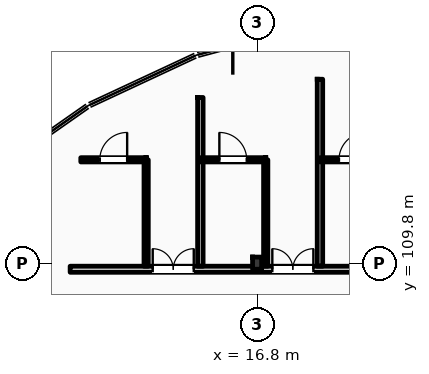
"""IFC4 building model, lengths in metres.
Left out: names, types, materials, properties, quantities, classifications, styles, units other than length and angle.
Written with IfcOpenShell. Run it as: python <this file> out.ifc"""

import sys

from ifc_helpers import new_model, si_unit, direction, frame, frame_2d, origin, origin_2d, place, context, subcontext, project, spatial, rectangle, i_section, extrude, element, fill, save


model = new_model("IFC4")
c1 = context("Model", 3, precision=1e-05, world=origin(), true_north=direction((0.0, 1.0)))
c2 = subcontext(c1, "Body", "Model", "MODEL_VIEW")
j1 = project(units=[si_unit("LENGTHUNIT", "METRE"), si_unit("PLANEANGLEUNIT", "RADIAN")], contexts=[c1])
p1 = place(None, origin())
s1 = spatial("IfcSite", under=j1, at=p1, CompositionType="ELEMENT")
p2 = place(p1, origin())
s2 = spatial("IfcBuilding", under=s1, at=p2, CompositionType="ELEMENT")
p3 = place(p2, frame((0.0, 0.0, 39.0)))
s3 = spatial("IfcBuildingStorey", under=s2, at=p3, CompositionType="ELEMENT", Elevation=39.0)
p4 = place(p3, frame((16.8, 109.8, 0.0), z_axis=(0.0, 0.0, 1.0), x_axis=(1.0, 0.0, 0.0)))
e1 = element("IfcColumn", 1, at=p4, inside=s3, PredefinedType="COLUMN", context=c2, shape_type="SweptSolid", body=[
    extrude(i_section(OverallWidth=0.3, OverallDepth=0.4, WebThickness=0.013, FlangeThickness=0.024, FilletRadius=0.027, at=origin_2d()), origin(), (0.0, 0.0, 1.0), 3.6),
])
p5 = place(p3, frame((10.65, 109.6, 0.0), z_axis=(0.0, 0.0, 1.0), x_axis=(1.0, 0.0, 0.0)))
e2 = element("IfcWall", 2, at=p5, inside=s3, PredefinedType="PARTITIONING", context=c2, shape_type="SweptSolid", body=[
    extrude(rectangle(XDim=84.61, YDim=0.2, at=frame_2d((42.305, 0.0))), origin(), (0.0, 0.0, 1.0), 2.82),
])
p6 = place(p5, frame((15.49, 0.0, 0.0)))
e3 = element("IfcOpeningElement", 3, at=p6, cuts=e2, PredefinedType="OPENING", context=c2, shape_type="SweptSolid", body=[
    extrude(rectangle(XDim=1.02, YDim=2.2, at=frame_2d((0.51, 1.1))), frame((0.0, 0.11, 0.0), z_axis=(0.0, -1.0, 0.0), x_axis=(1.0, 0.0, 0.0)), (0.0, 0.0, 1.0), 0.22),
])
p7 = place(p5, frame((19.703, 0.0, 0.0)))
e4 = element("IfcOpeningElement", 4, at=p7, cuts=e2, PredefinedType="OPENING", context=c2, shape_type="SweptSolid", body=[
    extrude(rectangle(XDim=1.02, YDim=2.2, at=frame_2d((0.51, 1.1))), frame((0.0, 0.11, 0.0), z_axis=(0.0, -1.0, 0.0), x_axis=(1.0, 0.0, 0.0)), (0.0, 0.0, 1.0), 0.22),
])
p8 = place(p5, frame((24.203, 0.0, 0.0)))
e5 = element("IfcOpeningElement", 5, at=p8, cuts=e2, PredefinedType="OPENING", context=c2, shape_type="SweptSolid", body=[
    extrude(rectangle(XDim=1.02, YDim=2.2, at=frame_2d((0.51, 1.1))), frame((0.0, 0.11, 0.0), z_axis=(0.0, -1.0, 0.0), x_axis=(1.0, 0.0, 0.0)), (0.0, 0.0, 1.0), 0.22),
])
p9 = place(p5, frame((26.552, 0.0, 0.0)))
e6 = element("IfcOpeningElement", 6, at=p9, cuts=e2, PredefinedType="OPENING", context=c2, shape_type="SweptSolid", body=[
    extrude(rectangle(XDim=1.02, YDim=2.2, at=frame_2d((0.51, 1.1))), frame((0.0, 0.11, 0.0), z_axis=(0.0, -1.0, 0.0), x_axis=(1.0, 0.0, 0.0)), (0.0, 0.0, 1.0), 0.22),
])
p10 = place(p5, frame((33.233, 0.0, 0.0)))
e7 = element("IfcOpeningElement", 7, at=p10, cuts=e2, PredefinedType="OPENING", context=c2, shape_type="SweptSolid", body=[
    extrude(rectangle(XDim=0.96, YDim=2.2, at=frame_2d((0.48, 1.1))), frame((0.0, 0.11, 0.0), z_axis=(0.0, -1.0, 0.0), x_axis=(1.0, 0.0, 0.0)), (0.0, 0.0, 1.0), 0.22),
])
p11 = place(p5, frame((35.583, 0.0, 0.0)))
e8 = element("IfcOpeningElement", 8, at=p11, cuts=e2, PredefinedType="OPENING", context=c2, shape_type="SweptSolid", body=[
    extrude(rectangle(XDim=0.96, YDim=2.2, at=frame_2d((0.48, 1.1))), frame((0.0, 0.11, 0.0), z_axis=(0.0, -1.0, 0.0), x_axis=(1.0, 0.0, 0.0)), (0.0, 0.0, 1.0), 0.22),
])
p12 = place(p5, frame((42.233, 0.0, 0.0)))
e9 = element("IfcOpeningElement", 9, at=p12, cuts=e2, PredefinedType="OPENING", context=c2, shape_type="SweptSolid", body=[
    extrude(rectangle(XDim=0.96, YDim=2.2, at=frame_2d((0.48, 1.1))), frame((0.0, 0.11, 0.0), z_axis=(0.0, -1.0, 0.0), x_axis=(1.0, 0.0, 0.0)), (0.0, 0.0, 1.0), 0.22),
])
p13 = place(p5, frame((46.983, 0.0, 0.0)))
e10 = element("IfcOpeningElement", 10, at=p13, cuts=e2, PredefinedType="OPENING", context=c2, shape_type="SweptSolid", body=[
    extrude(rectangle(XDim=0.96, YDim=2.2, at=frame_2d((0.48, 1.1))), frame((0.0, 0.11, 0.0), z_axis=(0.0, -1.0, 0.0), x_axis=(1.0, 0.0, 0.0)), (0.0, 0.0, 1.0), 0.22),
])
p14 = place(p5, frame((51.233, 0.0, 0.0)))
e11 = element("IfcOpeningElement", 11, at=p14, cuts=e2, PredefinedType="OPENING", context=c2, shape_type="SweptSolid", body=[
    extrude(rectangle(XDim=0.96, YDim=2.2, at=frame_2d((0.48, 1.1))), frame((0.0, 0.11, 0.0), z_axis=(0.0, -1.0, 0.0), x_axis=(1.0, 0.0, 0.0)), (0.0, 0.0, 1.0), 0.22),
])
p15 = place(p5, frame((55.733, 0.0, 0.0)))
e12 = element("IfcOpeningElement", 12, at=p15, cuts=e2, PredefinedType="OPENING", context=c2, shape_type="SweptSolid", body=[
    extrude(rectangle(XDim=0.96, YDim=2.2, at=frame_2d((0.48, 1.1))), frame((0.0, 0.11, 0.0), z_axis=(0.0, -1.0, 0.0), x_axis=(1.0, 0.0, 0.0)), (0.0, 0.0, 1.0), 0.22),
])
p16 = place(p5, frame((58.083, 0.0, 0.0)))
e13 = element("IfcOpeningElement", 13, at=p16, cuts=e2, PredefinedType="OPENING", context=c2, shape_type="SweptSolid", body=[
    extrude(rectangle(XDim=0.96, YDim=2.2, at=frame_2d((0.48, 1.1))), frame((0.0, 0.11, 0.0), z_axis=(0.0, -1.0, 0.0), x_axis=(1.0, 0.0, 0.0)), (0.0, 0.0, 1.0), 0.22),
])
p17 = place(p5, frame((64.732, 0.0, 0.0)))
e14 = element("IfcOpeningElement", 14, at=p17, cuts=e2, PredefinedType="OPENING", context=c2, shape_type="SweptSolid", body=[
    extrude(rectangle(XDim=0.96, YDim=2.2, at=frame_2d((0.48, 1.1))), frame((0.0, 0.11, 0.0), z_axis=(0.0, -1.0, 0.0), x_axis=(1.0, 0.0, 0.0)), (0.0, 0.0, 1.0), 0.22),
])
p18 = place(p5, frame((66.832, 0.0, 0.0)))
e15 = element("IfcOpeningElement", 15, at=p18, cuts=e2, PredefinedType="OPENING", context=c2, shape_type="SweptSolid", body=[
    extrude(rectangle(XDim=0.96, YDim=2.2, at=frame_2d((0.48, 1.1))), frame((0.0, 0.11, 0.0), z_axis=(0.0, -1.0, 0.0), x_axis=(1.0, 0.0, 0.0)), (0.0, 0.0, 1.0), 0.22),
])
p19 = place(p5, frame((73.732, 0.0, 0.0)))
e16 = element("IfcOpeningElement", 16, at=p19, cuts=e2, PredefinedType="OPENING", context=c2, shape_type="SweptSolid", body=[
    extrude(rectangle(XDim=0.96, YDim=2.2, at=frame_2d((0.48, 1.1))), frame((0.0, 0.11, 0.0), z_axis=(0.0, -1.0, 0.0), x_axis=(1.0, 0.0, 0.0)), (0.0, 0.0, 1.0), 0.22),
])
p20 = place(p5, frame((78.233, 0.0, 0.0)))
e17 = element("IfcOpeningElement", 17, at=p20, cuts=e2, PredefinedType="OPENING", context=c2, shape_type="SweptSolid", body=[
    extrude(rectangle(XDim=0.96, YDim=2.2, at=frame_2d((0.48, 1.1))), frame((0.0, 0.11, 0.0), z_axis=(0.0, -1.0, 0.0), x_axis=(1.0, 0.0, 0.0)), (0.0, 0.0, 1.0), 0.22),
])
p21 = place(p5, frame((80.62, 0.0, 0.0)))
e18 = element("IfcOpeningElement", 18, at=p21, cuts=e2, PredefinedType="OPENING", context=c2, shape_type="SweptSolid", body=[
    extrude(rectangle(XDim=0.96, YDim=2.2, at=frame_2d((0.48, 1.1))), frame((0.0, 0.11, 0.0), z_axis=(0.0, -1.0, 0.0), x_axis=(1.0, 0.0, 0.0)), (0.0, 0.0, 1.0), 0.22),
])
p22 = place(p5, frame((2.716, 0.0, 0.0)))
e19 = element("IfcOpeningElement", 19, at=p22, cuts=e2, PredefinedType="OPENING", context=c2, shape_type="SweptSolid", body=[
    extrude(rectangle(XDim=1.35, YDim=2.25, at=frame_2d((0.675, 1.125))), frame((0.0, 0.11, 0.0), z_axis=(0.0, -1.0, 0.0), x_axis=(1.0, 0.0, 0.0)), (0.0, 0.0, 1.0), 0.22),
])
p23 = place(p5, frame((6.65, 0.0, 0.0)))
e20 = element("IfcOpeningElement", 20, at=p23, cuts=e2, PredefinedType="OPENING", context=c2, shape_type="SweptSolid", body=[
    extrude(rectangle(XDim=1.35, YDim=2.25, at=frame_2d((0.675, 1.125))), frame((0.0, 0.11, 0.0), z_axis=(0.0, -1.0, 0.0), x_axis=(1.0, 0.0, 0.0)), (0.0, 0.0, 1.0), 0.22),
])
p24 = place(p5, frame((10.583, 0.0, 0.0)))
e21 = element("IfcOpeningElement", 21, at=p24, cuts=e2, PredefinedType="OPENING", context=c2, shape_type="SweptSolid", body=[
    extrude(rectangle(XDim=1.35, YDim=2.25, at=frame_2d((0.675, 1.125))), frame((0.0, 0.11, 0.0), z_axis=(0.0, -1.0, 0.0), x_axis=(1.0, 0.0, 0.0)), (0.0, 0.0, 1.0), 0.22),
])
p25 = place(p3, frame((14.933, 109.7, 0.0), z_axis=(0.0, 0.0, 1.0), x_axis=(0.0, 1.0, 0.0)))
e22 = element("IfcWall", 22, at=p25, inside=s3, PredefinedType="PARTITIONING", context=c2, shape_type="SweptSolid", body=[
    extrude(rectangle(XDim=5.55, YDim=0.18, at=frame_2d((2.775, 0.0))), origin(), (0.0, 0.0, 1.0), 3.38),
])
p26 = place(p3, frame((13.15, 109.7, 0.0), z_axis=(0.0, 0.0, 1.0), x_axis=(0.0, 1.0, 0.0)))
e23 = element("IfcWall", 23, at=p26, inside=s3, PredefinedType="PARTITIONING", context=c2, shape_type="SweptSolid", body=[
    extrude(rectangle(XDim=3.5, YDim=0.14, at=frame_2d((1.75, 0.0))), origin(), (0.0, 0.0, 1.0), 3.38),
])
p27 = place(p3, frame((11.0, 113.2, 0.0), z_axis=(0.0, 0.0, 1.0), x_axis=(1.0, 0.0, 0.0)))
e24 = element("IfcWall", 24, at=p27, inside=s3, PredefinedType="PARTITIONING", context=c2, shape_type="SweptSolid", body=[
    extrude(rectangle(XDim=2.15, YDim=0.14, at=frame_2d((1.075, 0.0))), origin(), (0.0, 0.0, 1.0), 3.38),
])
p28 = place(p27, frame((0.625, 0.0, 0.0)))
e25 = element("IfcOpeningElement", 25, at=p28, cuts=e24, PredefinedType="OPENING", context=c2, shape_type="SweptSolid", body=[
    extrude(rectangle(XDim=0.9, YDim=2.1, at=frame_2d((0.45, 1.05))), frame((0.0, 0.08, 0.0), z_axis=(0.0, -1.0, 0.0), x_axis=(1.0, 0.0, 0.0)), (0.0, 0.0, 1.0), 0.16),
])
p29 = place(p3, frame((18.867, 109.7, 0.0), z_axis=(0.0, 0.0, 1.0), x_axis=(0.0, 1.0, 0.0)))
e26 = element("IfcWall", 26, at=p29, inside=s3, PredefinedType="PARTITIONING", context=c2, shape_type="SweptSolid", body=[
    extrude(rectangle(XDim=6.15, YDim=0.18, at=frame_2d((3.075, 0.0))), origin(), (0.0, 0.0, 1.0), 3.38),
])
p30 = place(p3, frame((17.083, 109.7, 0.0), z_axis=(0.0, 0.0, 1.0), x_axis=(0.0, 1.0, 0.0)))
e27 = element("IfcWall", 27, at=p30, inside=s3, PredefinedType="PARTITIONING", context=c2, shape_type="SweptSolid", body=[
    extrude(rectangle(XDim=3.5, YDim=0.14, at=frame_2d((1.75, 0.0))), origin(), (0.0, 0.0, 1.0), 3.38),
])
p31 = place(p3, frame((14.933, 113.2, 0.0), z_axis=(0.0, 0.0, 1.0), x_axis=(1.0, 0.0, 0.0)))
e28 = element("IfcWall", 28, at=p31, inside=s3, PredefinedType="PARTITIONING", context=c2, shape_type="SweptSolid", body=[
    extrude(rectangle(XDim=2.15, YDim=0.14, at=frame_2d((1.075, 0.0))), origin(), (0.0, 0.0, 1.0), 3.38),
])
p32 = place(p31, frame((0.625, 0.0, 0.0)))
e29 = element("IfcOpeningElement", 29, at=p32, cuts=e28, PredefinedType="OPENING", context=c2, shape_type="SweptSolid", body=[
    extrude(rectangle(XDim=0.9, YDim=2.1, at=frame_2d((0.45, 1.05))), frame((0.0, 0.08, 0.0), z_axis=(0.0, -1.0, 0.0), x_axis=(1.0, 0.0, 0.0)), (0.0, 0.0, 1.0), 0.16),
])
p33 = place(p3, frame((18.867, 113.2, 0.0), z_axis=(0.0, 0.0, 1.0), x_axis=(1.0, 0.0, 0.0)))
e30 = element("IfcWall", 30, at=p33, inside=s3, PredefinedType="PARTITIONING", context=c2, shape_type="SweptSolid", body=[
    extrude(rectangle(XDim=2.15, YDim=0.14, at=frame_2d((1.075, 0.0))), origin(), (0.0, 0.0, 1.0), 3.38),
])
p34 = place(p33, frame((0.625, 0.0, 0.0)))
e31 = element("IfcOpeningElement", 31, at=p34, cuts=e30, PredefinedType="OPENING", context=c2, shape_type="SweptSolid", body=[
    extrude(rectangle(XDim=0.9, YDim=2.1, at=frame_2d((0.45, 1.05))), frame((0.0, 0.08, 0.0), z_axis=(0.0, -1.0, 0.0), x_axis=(1.0, 0.0, 0.0)), (0.0, 0.0, 1.0), 0.16),
])
p35 = place(p22, origin())
e32 = element("IfcDoor", 32, at=p35, inside=s3, OperationType="DOUBLE_SWING_LEFT", PredefinedType="DOOR", context=c2, shape_type="SweptSolid", body=[
    extrude(rectangle(XDim=1.35, YDim=2.25, at=frame_2d((0.675, 1.125))), frame((0.0, 0.025, 0.0), z_axis=(0.0, -1.0, 0.0), x_axis=(1.0, 0.0, 0.0)), (0.0, 0.0, 1.0), 0.05),
])
fill(e19, e32)
p36 = place(p28, origin())
e33 = element("IfcDoor", 33, at=p36, inside=s3, OperationType="SINGLE_SWING_RIGHT", PredefinedType="DOOR", context=c2, shape_type="SweptSolid", body=[
    extrude(rectangle(XDim=0.9, YDim=2.1, at=frame_2d((0.45, 1.05))), frame((0.0, 0.025, 0.0), z_axis=(0.0, -1.0, 0.0), x_axis=(1.0, 0.0, 0.0)), (0.0, 0.0, 1.0), 0.05),
])
fill(e25, e33)
p37 = place(p23, origin())
e34 = element("IfcDoor", 34, at=p37, inside=s3, OperationType="DOUBLE_SWING_LEFT", PredefinedType="DOOR", context=c2, shape_type="SweptSolid", body=[
    extrude(rectangle(XDim=1.35, YDim=2.25, at=frame_2d((0.675, 1.125))), frame((0.0, 0.025, 0.0), z_axis=(0.0, -1.0, 0.0), x_axis=(1.0, 0.0, 0.0)), (0.0, 0.0, 1.0), 0.05),
])
fill(e20, e34)
p38 = place(p32, origin())
e35 = element("IfcDoor", 35, at=p38, inside=s3, OperationType="SINGLE_SWING_LEFT", PredefinedType="DOOR", context=c2, shape_type="SweptSolid", body=[
    extrude(rectangle(XDim=0.9, YDim=2.1, at=frame_2d((0.45, 1.05))), frame((0.0, 0.025, 0.0), z_axis=(0.0, -1.0, 0.0), x_axis=(1.0, 0.0, 0.0)), (0.0, 0.0, 1.0), 0.05),
])
fill(e29, e35)
p39 = place(p34, origin())
e36 = element("IfcDoor", 36, at=p39, inside=s3, OperationType="SINGLE_SWING_RIGHT", PredefinedType="DOOR", context=c2, shape_type="SweptSolid", body=[
    extrude(rectangle(XDim=0.9, YDim=2.1, at=frame_2d((0.45, 1.05))), frame((0.0, 0.025, 0.0), z_axis=(0.0, -1.0, 0.0), x_axis=(1.0, 0.0, 0.0)), (0.0, 0.0, 1.0), 0.05),
])
fill(e31, e36)
save(model, sys.argv[1])
